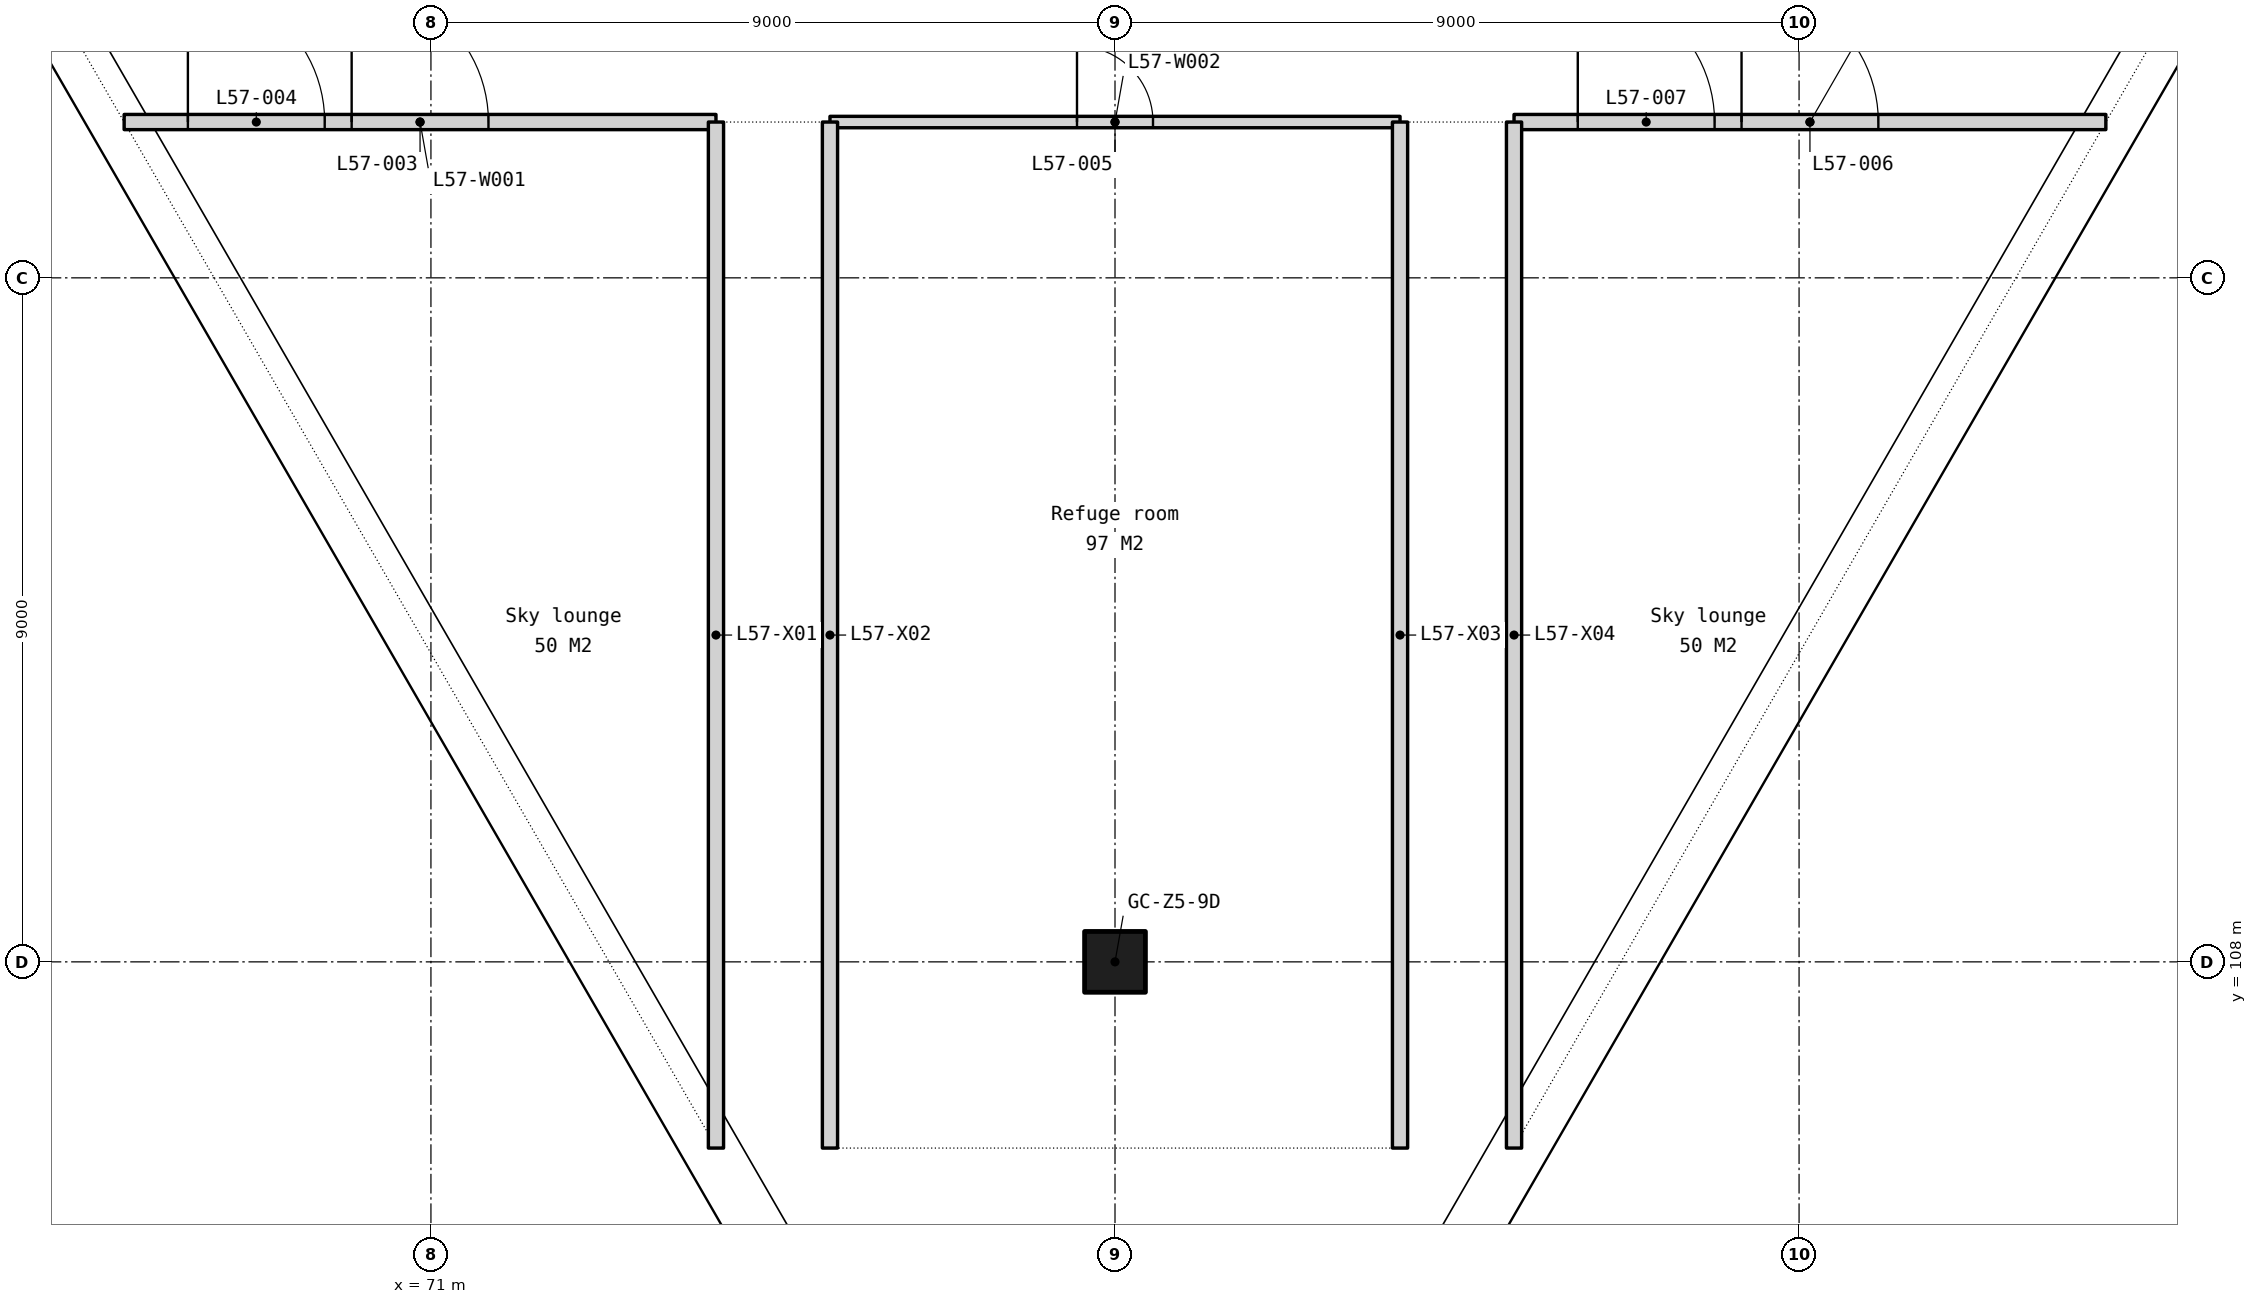
"""IFC4 building model, lengths in metres.
Left out: names, types, materials, properties, quantities, classifications, styles, units other than length and angle.
Written with IfcOpenShell. Run it as: python <this file> out.ifc"""

import sys

from ifc_helpers import new_model, si_unit, direction, frame, frame_2d, origin, origin_2d, place, context, subcontext, project, spatial, rectangle, extrude, element, fill, save


model = new_model("IFC4")
c1 = context("Model", 3, precision=1e-05, world=origin(), true_north=direction((0.0, 1.0)))
c2 = subcontext(c1, "Body", "Model", "MODEL_VIEW")
j1 = project(units=[si_unit("LENGTHUNIT", "METRE"), si_unit("PLANEANGLEUNIT", "RADIAN")], contexts=[c1])
p1 = place(None, origin())
s1 = spatial("IfcSite", under=j1, at=p1, CompositionType="ELEMENT")
p2 = place(p1, origin())
s2 = spatial("IfcBuilding", under=s1, at=p2, CompositionType="ELEMENT")
p3 = place(p2, frame((0.0, 0.0, 227.0)))
s3 = spatial("IfcBuildingStorey", under=s2, at=p3, CompositionType="ELEMENT", Elevation=227.0)
p4 = place(p3, frame((80.0, 108.0, 0.0), z_axis=(0.0, 0.0, 1.0), x_axis=(1.0, 0.0, 0.0)))
e1 = element("IfcColumn", 1, at=p4, inside=s3, PredefinedType="COLUMN", context=c2, shape_type="SweptSolid", body=[
    extrude(rectangle(XDim=0.8, YDim=0.8, at=origin_2d()), origin(), (0.0, 0.0, 1.0), 11.7),
])
p5 = place(p3, frame((66.964, 119.05, 0.0), z_axis=(0.0, 0.0, 1.0), x_axis=(1.0, 0.0, 0.0)))
e2 = element("IfcWall", 2, at=p5, inside=s3, PredefinedType="PARTITIONING", context=c2, shape_type="SweptSolid", body=[
    extrude(rectangle(XDim=7.786, YDim=0.2, at=frame_2d((3.893, 0.0))), origin(), (0.0, 0.0, 1.0), 11.25),
])
p6 = place(p5, frame((2.993, 0.0, 0.0)))
e3 = element("IfcOpeningElement", 3, at=p6, cuts=e2, PredefinedType="OPENING", context=c2, shape_type="SweptSolid", body=[
    extrude(rectangle(XDim=1.8, YDim=2.1, at=frame_2d((0.9, 1.05))), frame((0.0, 0.11, 0.0), z_axis=(0.0, -1.0, 0.0), x_axis=(1.0, 0.0, 0.0)), (0.0, 0.0, 1.0), 0.22),
])
p7 = place(p5, frame((0.839, 0.0, 0.0)))
e4 = element("IfcOpeningElement", 4, at=p7, cuts=e2, PredefinedType="OPENING", context=c2, shape_type="SweptSolid", body=[
    extrude(rectangle(XDim=1.8, YDim=2.1, at=frame_2d((0.9, 1.05))), frame((0.0, 0.11, 0.0), z_axis=(0.0, -1.0, 0.0), x_axis=(1.0, 0.0, 0.0)), (0.0, 0.0, 1.0), 0.22),
])
p8 = place(p3, frame((76.25, 119.05, 0.0), z_axis=(0.0, 0.0, 1.0), x_axis=(1.0, 0.0, 0.0)))
e5 = element("IfcWall", 5, at=p8, inside=s3, PredefinedType="PARTITIONING", context=c2, shape_type="SweptSolid", body=[
    extrude(rectangle(XDim=7.5, YDim=0.15, at=frame_2d((3.75, 0.0))), origin(), (0.0, 0.0, 1.0), 11.25),
])
p9 = place(p8, frame((3.25, 0.0, 0.0)))
e6 = element("IfcOpeningElement", 6, at=p9, cuts=e5, PredefinedType="OPENING", context=c2, shape_type="SweptSolid", body=[
    extrude(rectangle(XDim=1.0, YDim=2.1, at=frame_2d((0.5, 1.05))), frame((0.0, 0.085, 0.0), z_axis=(0.0, -1.0, 0.0), x_axis=(1.0, 0.0, 0.0)), (0.0, 0.0, 1.0), 0.17),
])
p10 = place(p3, frame((85.25, 119.05, 0.0), z_axis=(0.0, 0.0, 1.0), x_axis=(1.0, 0.0, 0.0)))
e7 = element("IfcWall", 7, at=p10, inside=s3, PredefinedType="PARTITIONING", context=c2, shape_type="SweptSolid", body=[
    extrude(rectangle(XDim=7.786, YDim=0.2, at=frame_2d((3.893, 0.0))), origin(), (0.0, 0.0, 1.0), 11.25),
])
p11 = place(p10, frame((2.993, 0.0, 0.0)))
e8 = element("IfcOpeningElement", 8, at=p11, cuts=e7, PredefinedType="OPENING", context=c2, shape_type="SweptSolid", body=[
    extrude(rectangle(XDim=1.8, YDim=2.1, at=frame_2d((0.9, 1.05))), frame((0.0, 0.11, 0.0), z_axis=(0.0, -1.0, 0.0), x_axis=(1.0, 0.0, 0.0)), (0.0, 0.0, 1.0), 0.22),
])
p12 = place(p10, frame((0.839, 0.0, 0.0)))
e9 = element("IfcOpeningElement", 9, at=p12, cuts=e7, PredefinedType="OPENING", context=c2, shape_type="SweptSolid", body=[
    extrude(rectangle(XDim=1.8, YDim=2.1, at=frame_2d((0.9, 1.05))), frame((0.0, 0.11, 0.0), z_axis=(0.0, -1.0, 0.0), x_axis=(1.0, 0.0, 0.0)), (0.0, 0.0, 1.0), 0.22),
])
for number, where, z_axis, x_axis in (
    (10, (74.75, 105.55, 0.0), (0.0, 0.0, 1.0), (0.0, 1.0, 0.0)),
    (11, (76.25, 105.55, 0.0), (0.0, 0.0, 1.0), (0.0, 1.0, 0.0)),
    (12, (83.75, 105.55, 0.0), (0.0, 0.0, 1.0), (0.0, 1.0, 0.0)),
    (13, (85.25, 105.55, 0.0), (0.0, 0.0, 1.0), (0.0, 1.0, 0.0)),
):
    element("IfcWall", number, at=place(p3, frame(where, z_axis=z_axis, x_axis=x_axis)), inside=s3, PredefinedType="PARTITIONING", context=c2, shape_type="SweptSolid", body=[
        extrude(rectangle(XDim=13.5, YDim=0.2, at=frame_2d((6.75, 0.0))), origin(), (0.0, 0.0, 1.0), 11.25),
    ])
p13 = place(p6, origin())
e14 = element("IfcDoor", 14, at=p13, inside=s3, OperationType="SINGLE_SWING_LEFT", PredefinedType="DOOR", context=c2, shape_type="SweptSolid", body=[
    extrude(rectangle(XDim=1.8, YDim=2.1, at=frame_2d((0.9, 1.05))), frame((0.0, 0.025, 0.0), z_axis=(0.0, -1.0, 0.0), x_axis=(1.0, 0.0, 0.0)), (0.0, 0.0, 1.0), 0.05),
])
fill(e3, e14)
p14 = place(p7, origin())
e15 = element("IfcDoor", 15, at=p14, inside=s3, OperationType="SINGLE_SWING_LEFT", PredefinedType="DOOR", context=c2, shape_type="SweptSolid", body=[
    extrude(rectangle(XDim=1.8, YDim=2.1, at=frame_2d((0.9, 1.05))), frame((0.0, 0.025, 0.0), z_axis=(0.0, -1.0, 0.0), x_axis=(1.0, 0.0, 0.0)), (0.0, 0.0, 1.0), 0.05),
])
fill(e4, e15)
p15 = place(p9, origin())
e16 = element("IfcDoor", 16, at=p15, inside=s3, OperationType="SINGLE_SWING_LEFT", PredefinedType="DOOR", context=c2, shape_type="SweptSolid", body=[
    extrude(rectangle(XDim=1.0, YDim=2.1, at=frame_2d((0.5, 1.05))), frame((0.0, 0.025, 0.0), z_axis=(0.0, -1.0, 0.0), x_axis=(1.0, 0.0, 0.0)), (0.0, 0.0, 1.0), 0.05),
])
fill(e6, e16)
p16 = place(p11, origin())
e17 = element("IfcDoor", 17, at=p16, inside=s3, OperationType="SINGLE_SWING_LEFT", PredefinedType="DOOR", context=c2, shape_type="SweptSolid", body=[
    extrude(rectangle(XDim=1.8, YDim=2.1, at=frame_2d((0.9, 1.05))), frame((0.0, 0.025, 0.0), z_axis=(0.0, -1.0, 0.0), x_axis=(1.0, 0.0, 0.0)), (0.0, 0.0, 1.0), 0.05),
])
fill(e8, e17)
p17 = place(p12, origin())
e18 = element("IfcDoor", 18, at=p17, inside=s3, OperationType="SINGLE_SWING_LEFT", PredefinedType="DOOR", context=c2, shape_type="SweptSolid", body=[
    extrude(rectangle(XDim=1.8, YDim=2.1, at=frame_2d((0.9, 1.05))), frame((0.0, 0.025, 0.0), z_axis=(0.0, -1.0, 0.0), x_axis=(1.0, 0.0, 0.0)), (0.0, 0.0, 1.0), 0.05),
])
fill(e9, e18)
save(model, sys.argv[1])
